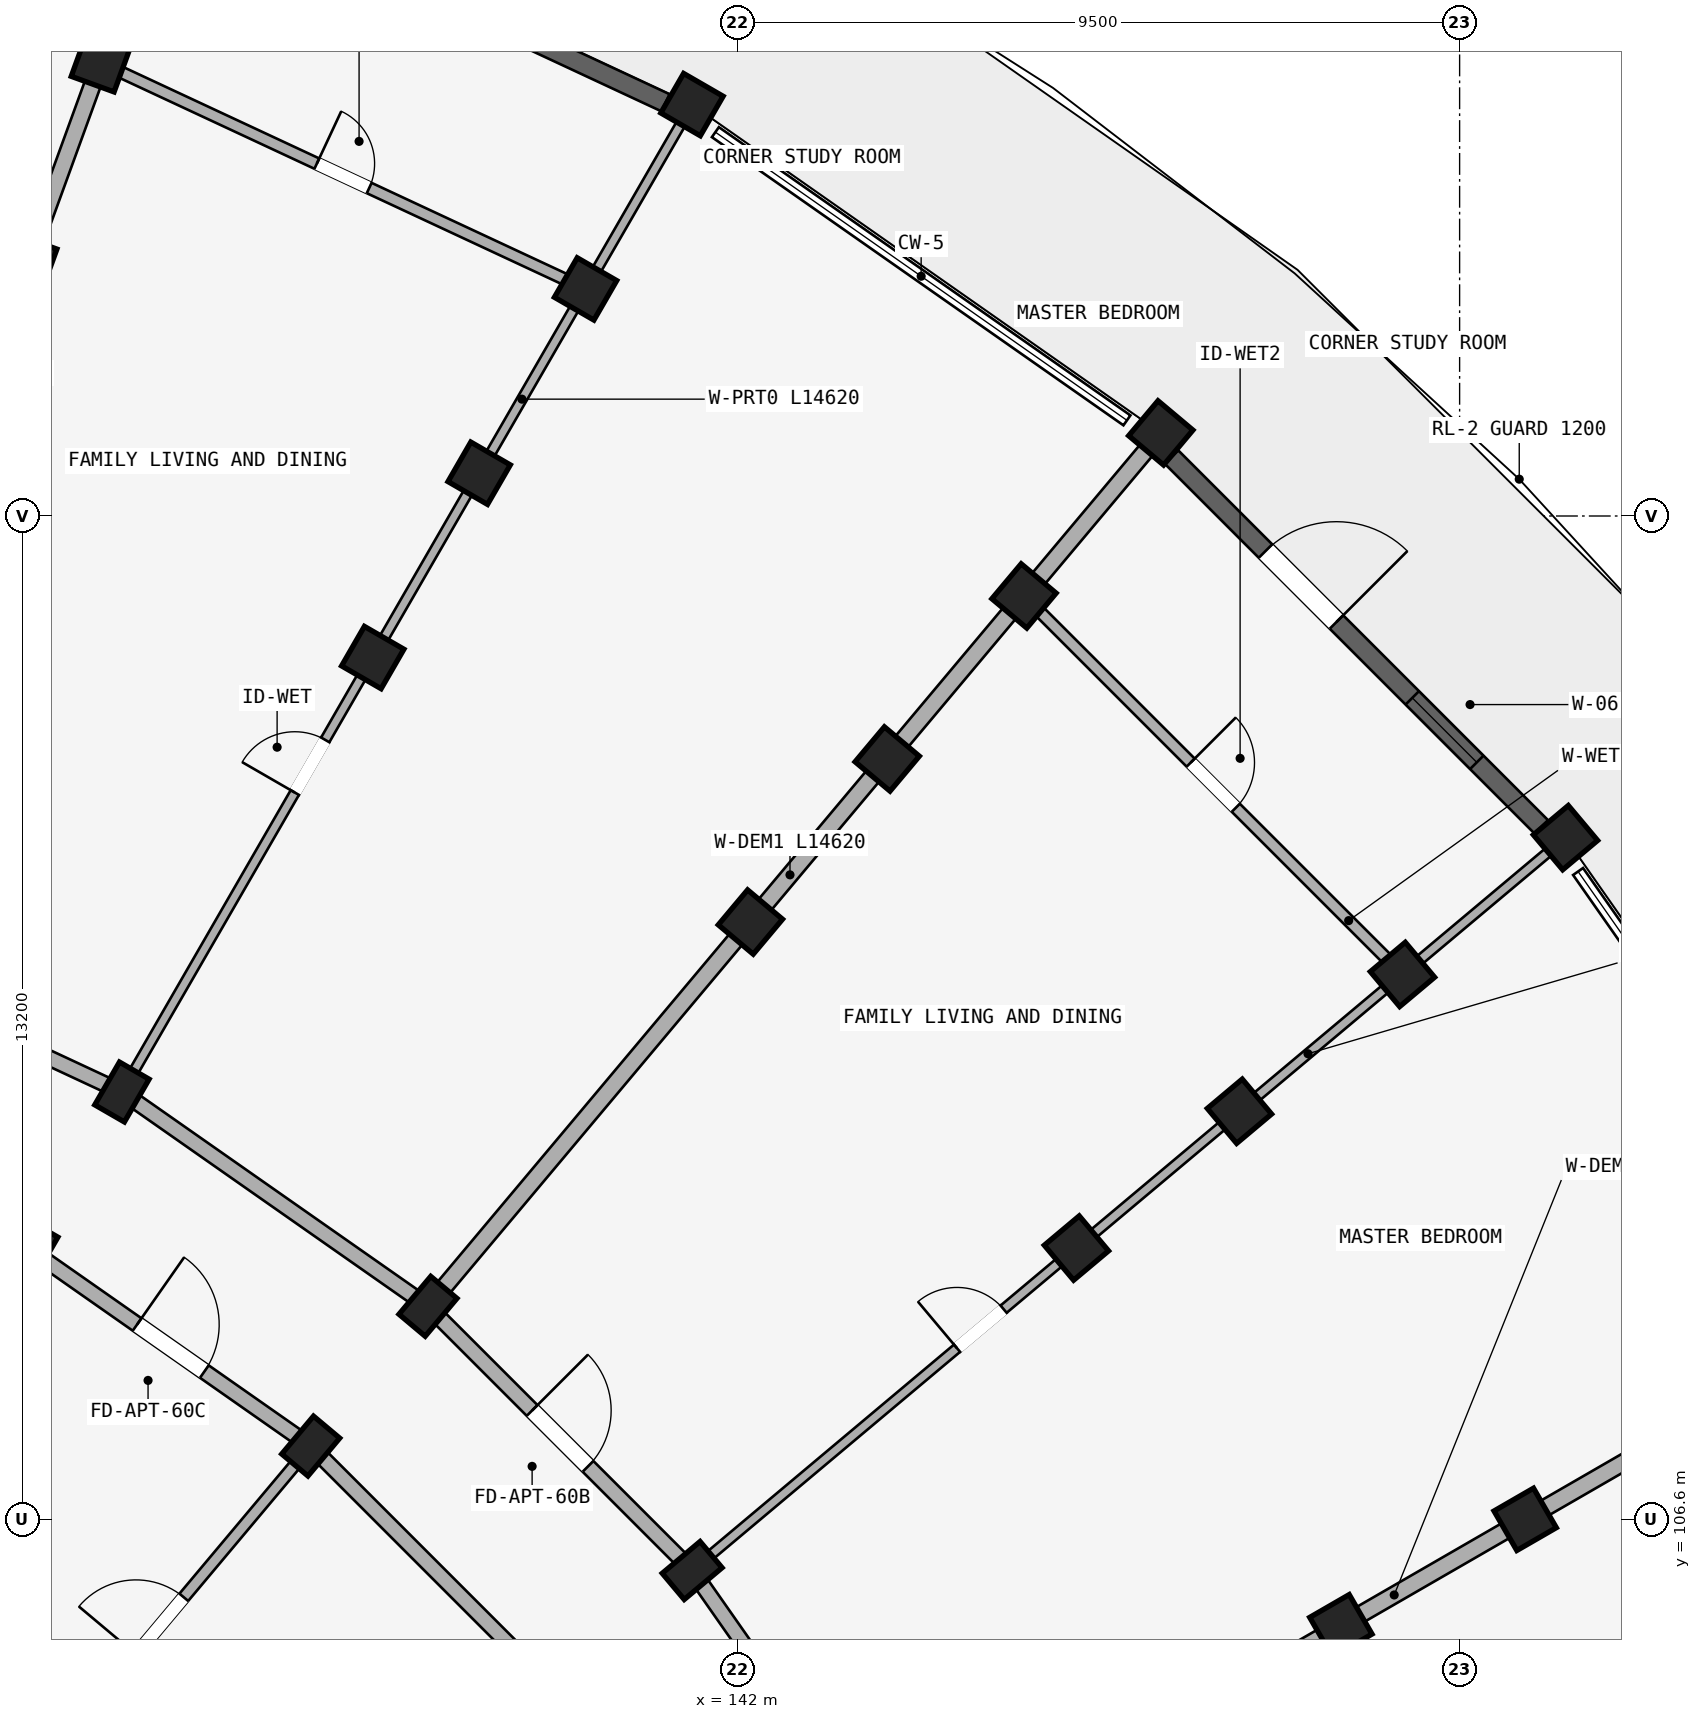
"""IFC4 building model, lengths in metres.
Left out: names, types, materials, properties, quantities, classifications, styles, units other than length and angle.
Written with IfcOpenShell. Run it as: python <this file> out.ifc"""

import sys

from ifc_helpers import new_model, si_unit, direction, frame, frame_2d, origin, origin_2d, place, context, subcontext, project, spatial, rectangle, extrude, element, fill, save


model = new_model("IFC4")
c1 = context("Model", 3, precision=1e-05, world=origin(), true_north=direction((0.0, 1.0)))
c2 = subcontext(c1, "Body", "Model", "MODEL_VIEW")
j1 = project(units=[si_unit("LENGTHUNIT", "METRE"), si_unit("PLANEANGLEUNIT", "RADIAN")], contexts=[c1])
p1 = place(None, origin())
s1 = spatial("IfcSite", under=j1, at=p1, CompositionType="ELEMENT")
p2 = place(p1, origin())
s2 = spatial("IfcBuilding", under=s1, at=p2, CompositionType="ELEMENT")
p3 = place(p2, frame((0.0, 0.0, 30.75)))
s3 = spatial("IfcBuildingStorey", under=s2, at=p3, CompositionType="ELEMENT", Elevation=30.75)
for number, where, z_axis, x_axis in (
    (1, (132.66, 123.132, 0.0), (0.0, 0.0, 1.0), (-0.94, 0.342, 0.0)),
    (2, (133.618, 125.764, 0.0), (0.0, 0.0, 1.0), (-0.94, 0.342, 0.0)),
):
    element("IfcColumn", number, at=place(p3, frame(where, z_axis=z_axis, x_axis=x_axis)), inside=s3, PredefinedType="COLUMN", context=c2, shape_type="SweptSolid", body=[
        extrude(rectangle(XDim=0.6, YDim=0.6, at=origin_2d()), origin(), (0.0, 0.0, 1.0), 2.93),
    ])
for number, where, z_axis, x_axis in (
    (3, (132.7, 110.144, 0.0), (0.0, 0.0, 1.0), (-0.866, 0.5, 0.0)),
    (4, (133.9, 112.222, 0.0), (0.0, 0.0, 1.0), (-0.866, 0.5, 0.0)),
):
    element("IfcColumn", number, at=place(p3, frame(where, z_axis=z_axis, x_axis=x_axis)), inside=s3, PredefinedType="COLUMN", context=c2, shape_type="SweptSolid", body=[
        extrude(rectangle(XDim=0.45, YDim=0.65, at=origin_2d()), origin(), (0.0, 0.0, 1.0), 2.93),
    ])
for number, where, z_axis, x_axis in (
    (5, (137.2, 117.938, 0.0), (0.0, 0.0, 1.0), (-0.866, 0.5, 0.0)),
    (6, (138.6, 120.363, 0.0), (0.0, 0.0, 1.0), (-0.866, 0.5, 0.0)),
    (7, (140.0, 122.787, 0.0), (0.0, 0.0, 1.0), (-0.866, 0.5, 0.0)),
):
    element("IfcColumn", number, at=place(p3, frame(where, z_axis=z_axis, x_axis=x_axis)), inside=s3, PredefinedType="COLUMN", context=c2, shape_type="SweptSolid", body=[
        extrude(rectangle(XDim=0.6, YDim=0.6, at=origin_2d()), origin(), (0.0, 0.0, 1.0), 2.93),
    ])
p4 = place(p3, frame((141.4, 125.212, 0.0), z_axis=(0.0, 0.0, 1.0), x_axis=(-0.866025403784, 0.5, 0.0)))
e8 = element("IfcColumn", 8, at=p4, inside=s3, PredefinedType="COLUMN", context=c2, shape_type="SweptSolid", body=[
    extrude(rectangle(XDim=0.6, YDim=0.6, at=origin_2d()), origin(), (0.0, 0.0, 1.0), 2.97),
])
for number, where, z_axis, x_axis in (
    (9, (136.384, 107.564, 0.0), (0.0, 0.0, 1.0), (-0.766, 0.643, 0.0)),
    (10, (137.927, 109.402, 0.0), (0.0, 0.0, 1.0), (-0.766, 0.643, 0.0)),
):
    element("IfcColumn", number, at=place(p3, frame(where, z_axis=z_axis, x_axis=x_axis)), inside=s3, PredefinedType="COLUMN", context=c2, shape_type="SweptSolid", body=[
        extrude(rectangle(XDim=0.45, YDim=0.65, at=origin_2d()), origin(), (0.0, 0.0, 1.0), 2.93),
    ])
for number, where, z_axis, x_axis in (
    (11, (142.169, 114.458, 0.0), (0.0, 0.0, 1.0), (-0.766, 0.643, 0.0)),
    (12, (143.969, 116.603, 0.0), (0.0, 0.0, 1.0), (-0.766, 0.643, 0.0)),
    (13, (145.769, 118.748, 0.0), (0.0, 0.0, 1.0), (-0.766, 0.643, 0.0)),
):
    element("IfcColumn", number, at=place(p3, frame(where, z_axis=z_axis, x_axis=x_axis)), inside=s3, PredefinedType="COLUMN", context=c2, shape_type="SweptSolid", body=[
        extrude(rectangle(XDim=0.6, YDim=0.6, at=origin_2d()), origin(), (0.0, 0.0, 1.0), 2.93),
    ])
p5 = place(p3, frame((147.568, 120.893, 0.0), z_axis=(0.0, 0.0, 1.0), x_axis=(-0.766044443119, 0.642787609687, 0.0)))
e14 = element("IfcColumn", 14, at=p5, inside=s3, PredefinedType="COLUMN", context=c2, shape_type="SweptSolid", body=[
    extrude(rectangle(XDim=0.6, YDim=0.6, at=origin_2d()), origin(), (0.0, 0.0, 1.0), 2.97),
])
p6 = place(p3, frame((141.402, 105.927, 0.0), z_axis=(0.0, 0.0, 1.0), x_axis=(-0.642787609687, 0.766044443119, 0.0)))
e15 = element("IfcColumn", 15, at=p6, inside=s3, PredefinedType="COLUMN", context=c2, shape_type="SweptSolid", body=[
    extrude(rectangle(XDim=0.45, YDim=0.65, at=origin_2d()), origin(), (0.0, 0.0, 1.0), 2.93),
])
for number, where, z_axis, x_axis in (
    (16, (146.458, 110.169, 0.0), (0.0, 0.0, 1.0), (-0.643, 0.766, 0.0)),
    (17, (148.603, 111.969, 0.0), (0.0, 0.0, 1.0), (-0.643, 0.766, 0.0)),
    (18, (150.748, 113.769, 0.0), (0.0, 0.0, 1.0), (-0.643, 0.766, 0.0)),
):
    element("IfcColumn", number, at=place(p3, frame(where, z_axis=z_axis, x_axis=x_axis)), inside=s3, PredefinedType="COLUMN", context=c2, shape_type="SweptSolid", body=[
        extrude(rectangle(XDim=0.6, YDim=0.6, at=origin_2d()), origin(), (0.0, 0.0, 1.0), 2.93),
    ])
p7 = place(p3, frame((152.893, 115.568, 0.0), z_axis=(0.0, 0.0, 1.0), x_axis=(-0.642787609687, 0.766044443119, 0.0)))
e19 = element("IfcColumn", 19, at=p7, inside=s3, PredefinedType="COLUMN", context=c2, shape_type="SweptSolid", body=[
    extrude(rectangle(XDim=0.6, YDim=0.6, at=origin_2d()), origin(), (0.0, 0.0, 1.0), 2.97),
])
for number, where, z_axis, x_axis in (
    (20, (149.938, 105.2, 0.0), (0.0, 0.0, 1.0), (-0.5, 0.866, 0.0)),
    (21, (152.363, 106.6, 0.0), (0.0, 0.0, 1.0), (-0.5, 0.866, 0.0)),
):
    element("IfcColumn", number, at=place(p3, frame(where, z_axis=z_axis, x_axis=x_axis)), inside=s3, PredefinedType="COLUMN", context=c2, shape_type="SweptSolid", body=[
        extrude(rectangle(XDim=0.6, YDim=0.6, at=origin_2d()), origin(), (0.0, 0.0, 1.0), 2.93),
    ])
p8 = place(p3, frame((129.445, 114.299, 0.0), z_axis=(0.0, 0.0, 1.0), x_axis=(0.906302381024, -0.422629854778, 0.0)))
e22 = element("IfcWall", 22, at=p8, inside=s3, PredefinedType="STANDARD", context=c2, shape_type="SweptSolid", body=[
    extrude(rectangle(XDim=4.915, YDim=0.2, at=frame_2d((2.458, 0.0))), origin(), (0.0, 0.0, 1.0), 2.372),
])
p9 = place(p8, frame((1.958, 0.0, 0.0)))
e23 = element("IfcOpeningElement", 23, at=p9, cuts=e22, PredefinedType="OPENING", context=c2, shape_type="SweptSolid", body=[
    extrude(rectangle(XDim=1.0, YDim=2.15, at=frame_2d((0.5, 1.075))), frame((0.0, 0.11, 0.0), z_axis=(0.0, -1.0, 0.0), x_axis=(1.0, 0.0, 0.0)), (0.0, 0.0, 1.0), 0.22),
])
p10 = place(p3, frame((132.7, 110.144, 0.0), z_axis=(0.0, 0.0, 1.0), x_axis=(0.819155404658, -0.573571637217, 0.0)))
e24 = element("IfcWall", 24, at=p10, inside=s3, PredefinedType="STANDARD", context=c2, shape_type="SweptSolid", body=[
    extrude(rectangle(XDim=4.497, YDim=0.2, at=frame_2d((2.249, 0.0))), origin(), (0.0, 0.0, 1.0), 2.372),
])
p11 = place(p10, frame((1.709, 0.0, 0.0)))
e25 = element("IfcOpeningElement", 25, at=p11, cuts=e24, PredefinedType="OPENING", context=c2, shape_type="SweptSolid", body=[
    extrude(rectangle(XDim=1.08, YDim=2.15, at=frame_2d((0.54, 1.075))), frame((0.0, 0.11, 0.0), z_axis=(0.0, -1.0, 0.0), x_axis=(1.0, 0.0, 0.0)), (0.0, 0.0, 1.0), 0.22),
])
p12 = place(p3, frame((133.9, 112.222, 0.0), z_axis=(0.0, 0.0, 1.0), x_axis=(0.819140911474, -0.573592335331, 0.0)))
e26 = element("IfcWall", 26, at=p12, inside=s3, PredefinedType="STANDARD", context=c2, shape_type="SweptSolid", body=[
    extrude(rectangle(XDim=4.916, YDim=0.2, at=frame_2d((2.458, 0.0))), origin(), (0.0, 0.0, 1.0), 2.372),
])
p13 = place(p3, frame((136.384, 107.564, 0.0), z_axis=(0.0, 0.0, 1.0), x_axis=(0.707106781187, -0.707106781187, 0.0)))
e27 = element("IfcWall", 27, at=p13, inside=s3, PredefinedType="STANDARD", context=c2, shape_type="SweptSolid", body=[
    extrude(rectangle(XDim=4.497, YDim=0.2, at=frame_2d((2.249, 0.0))), origin(), (0.0, 0.0, 1.0), 2.372),
])
p14 = place(p3, frame((137.927, 109.402, 0.0), z_axis=(0.0, 0.0, 1.0), x_axis=(0.707106781187, -0.707106781187, 0.0)))
e28 = element("IfcWall", 28, at=p14, inside=s3, PredefinedType="STANDARD", context=c2, shape_type="SweptSolid", body=[
    extrude(rectangle(XDim=4.916, YDim=0.2, at=frame_2d((2.458, 0.0))), origin(), (0.0, 0.0, 1.0), 2.372),
])
p15 = place(p14, frame((1.938, 0.0, 0.0)))
e29 = element("IfcOpeningElement", 29, at=p15, cuts=e28, PredefinedType="OPENING", context=c2, shape_type="SweptSolid", body=[
    extrude(rectangle(XDim=1.04, YDim=2.15, at=frame_2d((0.52, 1.075))), frame((0.0, 0.11, 0.0), z_axis=(0.0, -1.0, 0.0), x_axis=(1.0, 0.0, 0.0)), (0.0, 0.0, 1.0), 0.22),
])
p16 = place(p3, frame((141.402, 105.927, 0.0), z_axis=(0.0, 0.0, 1.0), x_axis=(0.573592335331, -0.819140911474, 0.0)))
e30 = element("IfcWall", 30, at=p16, inside=s3, PredefinedType="STANDARD", context=c2, shape_type="SweptSolid", body=[
    extrude(rectangle(XDim=4.916, YDim=0.2, at=frame_2d((2.458, 0.0))), origin(), (0.0, 0.0, 1.0), 2.372),
])
p17 = place(p3, frame((129.479, 114.393, 0.0), z_axis=(0.0, 0.0, 1.0), x_axis=(0.342015232663, 0.939694408106, 0.0)))
e31 = element("IfcWall", 31, at=p17, inside=s3, PredefinedType="STANDARD", context=c2, shape_type="SweptSolid", body=[
    extrude(rectangle(XDim=14.62, YDim=0.22, at=frame_2d((7.31, 0.0))), origin(), (0.0, 0.0, 1.0), 2.372),
])
p18 = place(p3, frame((133.95, 112.309, 0.0), z_axis=(0.0, 0.0, 1.0), x_axis=(0.500007702989, 0.866020956416, 0.0)))
e32 = element("IfcWall", 32, at=p18, inside=s3, PredefinedType="PARTITIONING", context=c2, shape_type="SweptSolid", body=[
    extrude(rectangle(XDim=14.62, YDim=0.125, at=frame_2d((7.31, 0.0))), origin(), (0.0, 0.0, 1.0), 2.372),
])
p19 = place(p18, frame((4.449, 0.0, 0.0)))
e33 = element("IfcOpeningElement", 33, at=p19, cuts=e32, PredefinedType="OPENING", context=c2, shape_type="SweptSolid", body=[
    extrude(rectangle(XDim=0.8, YDim=2.1, at=frame_2d((0.4, 1.05))), frame((0.0, 0.073, 0.0), z_axis=(0.0, -1.0, 0.0), x_axis=(1.0, 0.0, 0.0)), (0.0, 0.0, 1.0), 0.145),
])
p20 = place(p3, frame((132.013, 102.355, 0.0), z_axis=(0.0, 0.0, 1.0), x_axis=(0.642784846501, 0.766046761698, 0.0)))
e34 = element("IfcWall", 34, at=p20, inside=s3, PredefinedType="PARTITIONING", context=c2, shape_type="SweptSolid", body=[
    extrude(rectangle(XDim=6.75, YDim=0.15, at=frame_2d((3.375, 0.0))), origin(), (0.0, 0.0, 1.0), 2.372),
])
p21 = place(p20, frame((3.222, 0.0, 0.0)))
e35 = element("IfcOpeningElement", 35, at=p21, cuts=e34, PredefinedType="OPENING", context=c2, shape_type="SweptSolid", body=[
    extrude(rectangle(XDim=0.98, YDim=2.12, at=frame_2d((0.49, 1.06))), frame((0.0, 0.085, 0.0), z_axis=(0.0, -1.0, 0.0), x_axis=(1.0, 0.0, 0.0)), (0.0, 0.0, 1.0), 0.17),
])
p22 = place(p3, frame((137.991, 109.479, 0.0), z_axis=(0.0, 0.0, 1.0), x_axis=(0.642779216656, 0.76605148563, 0.0)))
e36 = element("IfcWall", 36, at=p22, inside=s3, PredefinedType="STANDARD", context=c2, shape_type="SweptSolid", body=[
    extrude(rectangle(XDim=14.62, YDim=0.22, at=frame_2d((7.31, 0.0))), origin(), (0.0, 0.0, 1.0), 2.372),
])
p23 = place(p3, frame((141.479, 105.991, 0.0), z_axis=(0.0, 0.0, 1.0), x_axis=(0.76605148563, 0.642779216656, 0.0)))
e37 = element("IfcWall", 37, at=p23, inside=s3, PredefinedType="PARTITIONING", context=c2, shape_type="SweptSolid", body=[
    extrude(rectangle(XDim=14.62, YDim=0.125, at=frame_2d((7.31, 0.0))), origin(), (0.0, 0.0, 1.0), 2.372),
])
p24 = place(p23, frame((4.449, 0.0, 0.0)))
e38 = element("IfcOpeningElement", 38, at=p24, cuts=e37, PredefinedType="OPENING", context=c2, shape_type="SweptSolid", body=[
    extrude(rectangle(XDim=0.8, YDim=2.1, at=frame_2d((0.4, 1.05))), frame((0.0, 0.073, 0.0), z_axis=(0.0, -1.0, 0.0), x_axis=(1.0, 0.0, 0.0)), (0.0, 0.0, 1.0), 0.145),
])
p25 = place(p3, frame((144.309, 101.95, 0.0), z_axis=(0.0, 0.0, 1.0), x_axis=(0.866020956416, 0.500007702989, 0.0)))
e39 = element("IfcWall", 39, at=p25, inside=s3, PredefinedType="STANDARD", context=c2, shape_type="SweptSolid", body=[
    extrude(rectangle(XDim=14.62, YDim=0.22, at=frame_2d((7.31, 0.0))), origin(), (0.0, 0.0, 1.0), 2.372),
])
p26 = place(p3, frame((133.618, 125.764, 0.0), z_axis=(0.0, 0.0, 1.0), x_axis=(0.906297360311, -0.422640621205, 0.0)))
e40 = element("IfcWall", 40, at=p26, inside=s3, PredefinedType="PLUMBINGWALL", context=c2, shape_type="SweptSolid", body=[
    extrude(rectangle(XDim=7.042, YDim=0.15, at=frame_2d((3.521, 0.0))), origin(), (0.0, 0.0, 1.0), 2.372),
])
p27 = place(p26, frame((3.141, 0.0, 0.0)))
e41 = element("IfcOpeningElement", 41, at=p27, cuts=e40, PredefinedType="OPENING", context=c2, shape_type="SweptSolid", body=[
    extrude(rectangle(XDim=0.76, YDim=2.05, at=frame_2d((0.38, 1.025))), frame((0.0, 0.085, 0.0), z_axis=(0.0, -1.0, 0.0), x_axis=(1.0, 0.0, 0.0)), (0.0, 0.0, 1.0), 0.17),
])
p28 = place(p3, frame((145.769, 118.748, 0.0), z_axis=(0.0, 0.0, 1.0), x_axis=(0.707106781187, -0.707106781187, 0.0)))
e42 = element("IfcWall", 42, at=p28, inside=s3, PredefinedType="PLUMBINGWALL", context=c2, shape_type="SweptSolid", body=[
    extrude(rectangle(XDim=7.042, YDim=0.15, at=frame_2d((3.521, 0.0))), origin(), (0.0, 0.0, 1.0), 2.372),
])
p29 = place(p28, frame((3.101, 0.0, 0.0)))
e43 = element("IfcOpeningElement", 43, at=p29, cuts=e42, PredefinedType="OPENING", context=c2, shape_type="SweptSolid", body=[
    extrude(rectangle(XDim=0.84, YDim=2.1, at=frame_2d((0.42, 1.05))), frame((0.0, 0.085, 0.0), z_axis=(0.0, -1.0, 0.0), x_axis=(1.0, 0.0, 0.0)), (0.0, 0.0, 1.0), 0.17),
])
p30 = place(p3, frame((134.818, 128.144, 0.0), z_axis=(0.0, 0.0, 1.0), x_axis=(0.906302789289, -0.422628979279, 0.0)))
e44 = element("IfcWall", 44, at=p30, inside=s3, PredefinedType="STANDARD", context=c2, shape_type="SweptSolid", body=[
    extrude(rectangle(XDim=6.879, YDim=0.25, at=frame_2d((3.439, 0.0))), origin(), (0.0, 0.0, 1.0), 2.412),
])
p31 = place(p30, frame((2.54, 0.0, 0.562)))
e45 = element("IfcOpeningElement", 45, at=p31, cuts=e44, PredefinedType="OPENING", context=c2, shape_type="SweptSolid", body=[
    extrude(rectangle(XDim=1.8, YDim=1.65, at=frame_2d((0.9, 0.825))), frame((0.0, 0.135, 0.0), z_axis=(0.0, -1.0, 0.0), x_axis=(1.0, 0.0, 0.0)), (0.0, 0.0, 1.0), 0.27),
])
p32 = place(p3, frame((147.71, 120.574, 0.0), z_axis=(0.0, 0.0, 1.0), x_axis=(0.707106781187, -0.707106781187, 0.0)))
e46 = element("IfcWall", 46, at=p32, inside=s3, PredefinedType="STANDARD", context=c2, shape_type="SweptSolid", body=[
    extrude(rectangle(XDim=6.879, YDim=0.25, at=frame_2d((3.439, 0.0))), origin(), (0.0, 0.0, 1.0), 2.412),
])
p33 = place(p32, frame((4.479, 0.0, 0.462)))
e47 = element("IfcOpeningElement", 47, at=p33, cuts=e46, PredefinedType="OPENING", context=c2, shape_type="SweptSolid", body=[
    extrude(rectangle(XDim=1.2, YDim=1.5, at=frame_2d((0.6, 0.75))), frame((0.0, 0.135, 0.0), z_axis=(0.0, -1.0, 0.0), x_axis=(1.0, 0.0, 0.0)), (0.0, 0.0, 1.0), 0.27),
])
p34 = place(p32, frame((1.748, 0.0, 0.0)))
e48 = element("IfcOpeningElement", 48, at=p34, cuts=e46, PredefinedType="OPENING", context=c2, shape_type="SweptSolid", body=[
    extrude(rectangle(XDim=1.32, YDim=2.15, at=frame_2d((0.66, 1.075))), frame((0.0, 0.135, 0.0), z_axis=(0.0, -1.0, 0.0), x_axis=(1.0, 0.0, 0.0)), (0.0, 0.0, 1.0), 0.27),
])
p35 = place(p33, origin())
e49 = element("IfcWindow", 49, at=p35, inside=s3, PartitioningType="SINGLE_PANEL", PredefinedType="WINDOW", context=c2, shape_type="SweptSolid", body=[
    extrude(rectangle(XDim=1.2, YDim=1.5, at=frame_2d((0.6, 0.75))), frame((0.0, 0.03, 0.0), z_axis=(0.0, -1.0, 0.0), x_axis=(1.0, 0.0, 0.0)), (0.0, 0.0, 1.0), 0.06),
])
fill(e47, e49)
p36 = place(p19, frame((0.8, 0.0, 0.0), z_axis=(0.0, 0.0, 1.0), x_axis=(-1.0, 0.0, 0.0)))
e50 = element("IfcDoor", 50, at=p36, inside=s3, OperationType="SINGLE_SWING_RIGHT", PredefinedType="DOOR", context=c2, shape_type="SweptSolid", body=[
    extrude(rectangle(XDim=0.8, YDim=2.1, at=frame_2d((0.4, 1.05))), frame((0.0, 0.025, 0.0), z_axis=(0.0, -1.0, 0.0), x_axis=(1.0, 0.0, 0.0)), (0.0, 0.0, 1.0), 0.05),
])
fill(e33, e50)
p37 = place(p21, origin())
e51 = element("IfcDoor", 51, at=p37, inside=s3, OperationType="SINGLE_SWING_LEFT", PredefinedType="DOOR", context=c2, shape_type="SweptSolid", body=[
    extrude(rectangle(XDim=0.98, YDim=2.12, at=frame_2d((0.49, 1.06))), frame((0.0, 0.025, 0.0), z_axis=(0.0, -1.0, 0.0), x_axis=(1.0, 0.0, 0.0)), (0.0, 0.0, 1.0), 0.05),
])
fill(e35, e51)
p38 = place(p24, frame((0.8, 0.0, 0.0), z_axis=(0.0, 0.0, 1.0), x_axis=(-1.0, 0.0, 0.0)))
e52 = element("IfcDoor", 52, at=p38, inside=s3, OperationType="SINGLE_SWING_RIGHT", PredefinedType="DOOR", context=c2, shape_type="SweptSolid", body=[
    extrude(rectangle(XDim=0.8, YDim=2.1, at=frame_2d((0.4, 1.05))), frame((0.0, 0.025, 0.0), z_axis=(0.0, -1.0, 0.0), x_axis=(1.0, 0.0, 0.0)), (0.0, 0.0, 1.0), 0.05),
])
fill(e38, e52)
p39 = place(p27, frame((0.76, 0.0, 0.0), z_axis=(0.0, 0.0, 1.0), x_axis=(-1.0, 0.0, 0.0)))
e53 = element("IfcDoor", 53, at=p39, inside=s3, OperationType="SINGLE_SWING_RIGHT", PredefinedType="DOOR", context=c2, shape_type="SweptSolid", body=[
    extrude(rectangle(XDim=0.76, YDim=2.05, at=frame_2d((0.38, 1.025))), frame((0.0, 0.025, 0.0), z_axis=(0.0, -1.0, 0.0), x_axis=(1.0, 0.0, 0.0)), (0.0, 0.0, 1.0), 0.05),
])
fill(e41, e53)
p40 = place(p15, origin())
e54 = element("IfcDoor", 54, at=p40, inside=s3, OperationType="SINGLE_SWING_LEFT", PredefinedType="DOOR", context=c2, shape_type="SweptSolid", body=[
    extrude(rectangle(XDim=1.04, YDim=2.15, at=frame_2d((0.52, 1.075))), frame((0.0, 0.025, 0.0), z_axis=(0.0, -1.0, 0.0), x_axis=(1.0, 0.0, 0.0)), (0.0, 0.0, 1.0), 0.05),
])
fill(e29, e54)
p41 = place(p29, frame((0.84, 0.0, 0.0), z_axis=(0.0, 0.0, 1.0), x_axis=(-1.0, 0.0, 0.0)))
e55 = element("IfcDoor", 55, at=p41, inside=s3, OperationType="SINGLE_SWING_RIGHT", PredefinedType="DOOR", context=c2, shape_type="SweptSolid", body=[
    extrude(rectangle(XDim=0.84, YDim=2.1, at=frame_2d((0.42, 1.05))), frame((0.0, 0.025, 0.0), z_axis=(0.0, -1.0, 0.0), x_axis=(1.0, 0.0, 0.0)), (0.0, 0.0, 1.0), 0.05),
])
fill(e43, e55)
p42 = place(p11, origin())
e56 = element("IfcDoor", 56, at=p42, inside=s3, OperationType="SINGLE_SWING_LEFT", PredefinedType="DOOR", context=c2, shape_type="SweptSolid", body=[
    extrude(rectangle(XDim=1.08, YDim=2.15, at=frame_2d((0.54, 1.075))), frame((0.0, 0.025, 0.0), z_axis=(0.0, -1.0, 0.0), x_axis=(1.0, 0.0, 0.0)), (0.0, 0.0, 1.0), 0.05),
])
fill(e25, e56)
p43 = place(p34, origin())
e57 = element("IfcDoor", 57, at=p43, inside=s3, OperationType="SINGLE_SWING_RIGHT", PredefinedType="DOOR", context=c2, shape_type="SweptSolid", body=[
    extrude(rectangle(XDim=1.32, YDim=2.15, at=frame_2d((0.66, 1.075))), frame((0.0, 0.025, 0.0), z_axis=(0.0, -1.0, 0.0), x_axis=(1.0, 0.0, 0.0)), (0.0, 0.0, 1.0), 0.05),
])
fill(e48, e57)
save(model, sys.argv[1])
